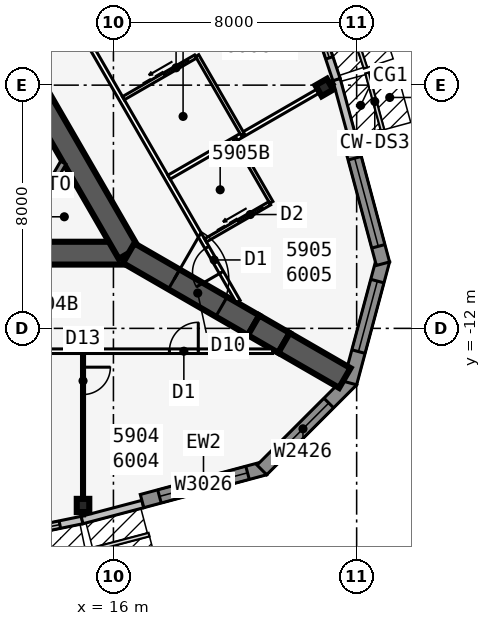
"""IFC4 building model, lengths in metres.
Left out: names, types, materials, properties, quantities, classifications, styles, units other than length and angle.
Written with IfcOpenShell. Run it as: python <this file> out.ifc"""

import sys

from ifc_helpers import new_model, si_unit, direction, frame, frame_2d, origin, origin_2d, place, context, subcontext, project, spatial, polyline, rectangle, i_section, outline, extrude, element, fill, save


model = new_model("IFC4")
c1 = context("Model", 3, precision=1e-05, world=origin(), true_north=direction((0.0, 1.0)))
c2 = subcontext(c1, "Body", "Model", "MODEL_VIEW")
j1 = project(units=[si_unit("LENGTHUNIT", "METRE"), si_unit("PLANEANGLEUNIT", "RADIAN")], contexts=[c1])
p1 = place(None, origin())
s1 = spatial("IfcSite", under=j1, at=p1, CompositionType="ELEMENT")
p2 = place(p1, origin())
s2 = spatial("IfcBuilding", under=s1, at=p2, CompositionType="ELEMENT")
p3 = place(p2, frame((0.0, 0.0, 222.5)))
s3 = spatial("IfcBuildingStorey", under=s2, at=p3, CompositionType="ELEMENT", Elevation=222.5)
p4 = place(p3, frame((-16.5, -9.526, 0.0), z_axis=(0.0, 0.0, 1.0), x_axis=(1.0, 0.0, 0.0)))
e1 = element("IfcWall", 1, at=p4, inside=s3, PredefinedType="SHEAR", context=c2, shape_type="SweptSolid", body=[
    extrude(rectangle(XDim=33.0, YDim=0.75, at=frame_2d((16.5, 0.0))), origin(), (0.0, 0.0, 1.0), 3.6),
])
p5 = place(p4, frame((14.05, 0.0, 0.0)))
e2 = element("IfcOpeningElement", 2, at=p5, cuts=e1, PredefinedType="OPENING", context=c2, shape_type="SweptSolid", body=[
    extrude(rectangle(XDim=1.8, YDim=2.13, at=frame_2d((0.9, 1.065))), frame((0.0, 0.385, 0.0), z_axis=(0.0, -1.0, 0.0), x_axis=(1.0, 0.0, 0.0)), (0.0, 0.0, 1.0), 0.77),
])
p6 = place(p3, frame((16.5, -9.526, 0.0), z_axis=(0.0, 0.0, 1.0), x_axis=(-0.499999749417, 0.866025548458, 0.0)))
e3 = element("IfcWall", 3, at=p6, inside=s3, PredefinedType="SHEAR", context=c2, shape_type="SweptSolid", body=[
    extrude(rectangle(XDim=33.0, YDim=0.75, at=frame_2d((16.5, 0.0))), origin(), (0.0, 0.0, 1.0), 3.6),
])
p7 = place(p6, frame((14.15, 0.0, 0.0)))
e4 = element("IfcOpeningElement", 4, at=p7, cuts=e3, PredefinedType="OPENING", context=c2, shape_type="SweptSolid", body=[
    extrude(rectangle(XDim=1.8, YDim=2.13, at=frame_2d((0.9, 1.065))), frame((0.0, 0.385, 0.0), z_axis=(0.0, -1.0, 0.0), x_axis=(1.0, 0.0, 0.0)), (0.0, 0.0, 1.0), 0.77),
])
p8 = place(p6, frame((12.6, 0.0, 0.0)))
e5 = element("IfcOpeningElement", 5, at=p8, cuts=e3, PredefinedType="OPENING", context=c2, shape_type="SweptSolid", body=[
    extrude(rectangle(XDim=1.0, YDim=2.13, at=frame_2d((0.5, 1.065))), frame((0.0, 0.385, 0.0), z_axis=(0.0, -1.0, 0.0), x_axis=(1.0, 0.0, 0.0)), (0.0, 0.0, 1.0), 0.77),
])
p9 = place(p3, frame((16.5, -9.526, 0.0), z_axis=(0.0, 0.0, 1.0), x_axis=(0.866031398331, -0.499989616998, 0.0)))
e6 = element("IfcWall", 6, at=p9, inside=s3, PredefinedType="SHEAR", context=c2, shape_type="SweptSolid", body=[
    extrude(rectangle(XDim=4.746, YDim=0.75, at=frame_2d((2.373, 0.0))), origin(), (0.0, 0.0, 1.0), 3.6),
])
p10 = place(p9, frame((1.725, 0.0, 0.0)))
e7 = element("IfcOpeningElement", 7, at=p10, cuts=e6, PredefinedType="OPENING", context=c2, shape_type="SweptSolid", body=[
    extrude(rectangle(XDim=1.8, YDim=2.13, at=frame_2d((0.9, 1.065))), frame((0.0, 0.385, 0.0), z_axis=(0.0, -1.0, 0.0), x_axis=(1.0, 0.0, 0.0)), (0.0, 0.0, 1.0), 0.77),
])
p11 = place(p3, frame((20.61, -11.899, 0.0), z_axis=(0.0, 0.0, 1.0), x_axis=(0.866009537788, -0.500027479704, 0.0)))
e8 = element("IfcWall", 8, at=p11, inside=s3, PredefinedType="SHEAR", context=c2, shape_type="SweptSolid", body=[
    extrude(rectangle(XDim=1.155, YDim=0.75, at=frame_2d((0.577, 0.0))), origin(), (0.0, 0.0, 1.0), 3.6),
])
p12 = place(p3, frame((21.61, -12.477, 0.0), z_axis=(0.0, 0.0, 1.0), x_axis=(0.866055313784, -0.499948190782, 0.0)))
e9 = element("IfcWall", 9, at=p12, inside=s3, PredefinedType="SHEAR", context=c2, shape_type="SweptSolid", body=[
    extrude(rectangle(XDim=2.309, YDim=0.75, at=frame_2d((1.155, 0.0))), origin(), (0.0, 0.0, 1.0), 3.6),
])
for number, where, z_axis, x_axis in (
    (10, (15.0, -17.825, 0.0), (0.0, 0.0, 1.0), (1.0, 0.0, 0.0)),
    (11, (22.937, -4.078, 0.0), (0.0, 0.0, 1.0), (-0.5, 0.866, 0.0)),
):
    element("IfcColumn", number, at=place(p3, frame(where, z_axis=z_axis, x_axis=x_axis)), inside=s3, PredefinedType="COLUMN", context=c2, shape_type="SweptSolid", body=[
        extrude(i_section(OverallWidth=0.411, OverallDepth=0.434, WebThickness=0.036, FlangeThickness=0.057, at=origin_2d()), origin(), (0.0, 0.0, 1.0), 3.6),
    ])
p13 = place(p3, frame((9.975, -19.332, 0.0), z_axis=(0.0, 0.0, 1.0), x_axis=(0.979461488189, 0.201631329795, 0.0)))
e12 = element("IfcWall", 12, at=p13, inside=s3, PredefinedType="STANDARD", context=c2, shape_type="SweptSolid", body=[
    extrude(rectangle(XDim=5.105, YDim=0.25, at=frame_2d((2.552, 0.0))), origin(), (0.0, 0.0, 1.0), 3.435),
])
p14 = place(p13, frame((0.752, 0.0, 0.45)))
e13 = element("IfcOpeningElement", 13, at=p14, cuts=e12, PredefinedType="OPENING", context=c2, shape_type="SweptSolid", body=[
    extrude(rectangle(XDim=3.6, YDim=2.6, at=frame_2d((1.8, 1.3))), frame((0.0, 0.135, 0.0), z_axis=(0.0, -1.0, 0.0), x_axis=(1.0, 0.0, 0.0)), (0.0, 0.0, 1.0), 0.27),
])
p15 = place(p3, frame((14.968, -18.304, 0.0), z_axis=(0.0, 0.0, 1.0), x_axis=(0.967010286052, 0.254737328772, 0.0)))
e14 = element("IfcWall", 14, at=p15, inside=s3, PredefinedType="STANDARD", context=c2, shape_type="SweptSolid", body=[
    extrude(rectangle(XDim=2.068, YDim=0.25, at=frame_2d((1.034, 0.0))), origin(), (0.0, 0.0, 1.0), 3.435),
])
p16 = place(p3, frame((16.942, -17.681, 0.0), z_axis=(0.0, 0.0, 1.0), x_axis=(0.965920442324, 0.258839137498, 0.0)))
e15 = element("IfcWall", 15, at=p16, inside=s3, PredefinedType="SOLIDWALL", context=c2, shape_type="SweptSolid", body=[
    extrude(rectangle(XDim=4.184, YDim=0.45, at=frame_2d((2.092, 0.0))), origin(), (0.0, 0.0, 1.0), 3.435),
])
p17 = place(p16, frame((0.592, 0.0, 0.45)))
e16 = element("IfcOpeningElement", 16, at=p17, cuts=e15, PredefinedType="OPENING", context=c2, shape_type="SweptSolid", body=[
    extrude(rectangle(XDim=3.0, YDim=2.6, at=frame_2d((1.5, 1.3))), frame((0.0, 0.235, 0.0), z_axis=(0.0, -1.0, 0.0), x_axis=(1.0, 0.0, 0.0)), (0.0, 0.0, 1.0), 0.47),
])
p18 = place(p3, frame((20.882, -16.656, 0.0), z_axis=(0.0, 0.0, 1.0), x_axis=(0.707077605902, 0.707135955267, 0.0)))
e17 = element("IfcWall", 17, at=p18, inside=s3, PredefinedType="SOLIDWALL", context=c2, shape_type="SweptSolid", body=[
    extrude(outline(polyline([(4.184, 0.225), (4.125, 0.225), (3.705, 0.113), (3.675, 0.225), (0.0, 0.225), (0.0, -0.225), (4.184, -0.225), (4.184, 0.225)])), origin(), (0.0, 0.0, 1.0), 3.435),
])
p19 = place(p18, frame((0.713, 0.0, 0.45)))
e18 = element("IfcOpeningElement", 18, at=p19, cuts=e17, PredefinedType="OPENING", context=c2, shape_type="SweptSolid", body=[
    extrude(rectangle(XDim=2.4, YDim=2.6, at=frame_2d((1.2, 1.3))), frame((0.0, 0.235, 0.0), z_axis=(0.0, -1.0, 0.0), x_axis=(1.0, 0.0, 0.0)), (0.0, 0.0, 1.0), 0.47),
])
p20 = place(p3, frame((23.783, -13.798, 0.0), z_axis=(0.0, 0.0, 1.0), x_axis=(0.258799282522, 0.96593112144, 0.0)))
e19 = element("IfcWall", 19, at=p20, inside=s3, PredefinedType="SOLIDWALL", context=c2, shape_type="SweptSolid", body=[
    extrude(outline(polyline([(4.184, 0.225), (0.509, 0.225), (0.479, 0.113), (0.059, 0.225), (0.0, 0.225), (0.0, -0.225), (4.184, -0.225), (4.184, 0.225)])), origin(), (0.0, 0.0, 1.0), 3.435),
])
p21 = place(p20, frame((1.071, 0.0, 0.45)))
e20 = element("IfcOpeningElement", 20, at=p21, cuts=e19, PredefinedType="OPENING", context=c2, shape_type="SweptSolid", body=[
    extrude(rectangle(XDim=2.4, YDim=2.6, at=frame_2d((1.2, 1.3))), frame((0.0, 0.235, 0.0), z_axis=(0.0, -1.0, 0.0), x_axis=(1.0, 0.0, 0.0)), (0.0, 0.0, 1.0), 0.47),
])
p22 = place(p3, frame((24.865, -9.873, 0.0), z_axis=(0.0, 0.0, 1.0), x_axis=(-0.258784695888, 0.965935029479, 0.0)))
e21 = element("IfcWall", 21, at=p22, inside=s3, PredefinedType="SOLIDWALL", context=c2, shape_type="SweptSolid", body=[
    extrude(rectangle(XDim=4.184, YDim=0.45, at=frame_2d((2.092, 0.0))), origin(), (0.0, 0.0, 1.0), 3.435),
])
p23 = place(p22, frame((0.592, 0.0, 0.45)))
e22 = element("IfcOpeningElement", 22, at=p23, cuts=e21, PredefinedType="OPENING", context=c2, shape_type="SweptSolid", body=[
    extrude(rectangle(XDim=3.0, YDim=2.6, at=frame_2d((1.5, 1.3))), frame((0.0, 0.235, 0.0), z_axis=(0.0, -1.0, 0.0), x_axis=(1.0, 0.0, 0.0)), (0.0, 0.0, 1.0), 0.47),
])
p24 = place(p3, frame((23.879, -5.806, 0.0), z_axis=(0.0, 0.0, 1.0), x_axis=(-0.262867703986, 0.964831887015, 0.0)))
e23 = element("IfcWall", 23, at=p24, inside=s3, PredefinedType="STANDARD", context=c2, shape_type="SweptSolid", body=[
    extrude(rectangle(XDim=2.068, YDim=0.25, at=frame_2d((1.034, 0.0))), origin(), (0.0, 0.0, 1.0), 3.435),
])
p25 = place(p3, frame((23.338, -3.817, 0.0), z_axis=(0.0, 0.0, 1.0), x_axis=(-0.315108478109, 0.949055660656, 0.0)))
e24 = element("IfcWall", 24, at=p25, inside=s3, PredefinedType="STANDARD", context=c2, shape_type="SweptSolid", body=[
    extrude(rectangle(XDim=5.105, YDim=0.25, at=frame_2d((2.552, 0.0))), origin(), (0.0, 0.0, 1.0), 3.435),
])
p26 = place(p25, frame((0.752, 0.0, 0.45)))
e25 = element("IfcOpeningElement", 25, at=p26, cuts=e24, PredefinedType="OPENING", context=c2, shape_type="SweptSolid", body=[
    extrude(rectangle(XDim=3.6, YDim=2.6, at=frame_2d((1.8, 1.3))), frame((0.0, 0.135, 0.0), z_axis=(0.0, -1.0, 0.0), x_axis=(1.0, 0.0, 0.0)), (0.0, 0.0, 1.0), 0.27),
])
p27 = place(p3, frame((-21.236, -12.751, 0.0), z_axis=(0.0, 0.0, 1.0), x_axis=(1.0, 0.0, 0.0)))
e26 = element("IfcWall", 26, at=p27, inside=s3, PredefinedType="PARTITIONING", context=c2, shape_type="SweptSolid", body=[
    extrude(rectangle(XDim=42.472, YDim=0.15, at=frame_2d((21.236, 0.0))), origin(), (0.0, 0.0, 1.0), 3.435),
])
p28 = place(p27, frame((2.444, 0.0, 0.0)))
e27 = element("IfcOpeningElement", 27, at=p28, cuts=e26, PredefinedType="OPENING", context=c2, shape_type="SweptSolid", body=[
    extrude(rectangle(XDim=0.95, YDim=2.13, at=frame_2d((0.475, 1.065))), frame((0.0, 0.085, 0.0), z_axis=(0.0, -1.0, 0.0), x_axis=(1.0, 0.0, 0.0)), (0.0, 0.0, 1.0), 0.17),
])
p29 = place(p27, frame((13.261, 0.0, 0.0)))
e28 = element("IfcOpeningElement", 28, at=p29, cuts=e26, PredefinedType="OPENING", context=c2, shape_type="SweptSolid", body=[
    extrude(rectangle(XDim=0.95, YDim=2.13, at=frame_2d((0.475, 1.065))), frame((0.0, 0.085, 0.0), z_axis=(0.0, -1.0, 0.0), x_axis=(1.0, 0.0, 0.0)), (0.0, 0.0, 1.0), 0.17),
])
p30 = place(p27, frame((23.236, 0.0, 0.0)))
e29 = element("IfcOpeningElement", 29, at=p30, cuts=e26, PredefinedType="OPENING", context=c2, shape_type="SweptSolid", body=[
    extrude(rectangle(XDim=1.0, YDim=2.13, at=frame_2d((0.5, 1.065))), frame((0.0, 0.085, 0.0), z_axis=(0.0, -1.0, 0.0), x_axis=(1.0, 0.0, 0.0)), (0.0, 0.0, 1.0), 0.17),
])
p31 = place(p27, frame((29.461, 0.0, 0.0)))
e30 = element("IfcOpeningElement", 30, at=p31, cuts=e26, PredefinedType="OPENING", context=c2, shape_type="SweptSolid", body=[
    extrude(rectangle(XDim=0.95, YDim=2.13, at=frame_2d((0.475, 1.065))), frame((0.0, 0.085, 0.0), z_axis=(0.0, -1.0, 0.0), x_axis=(1.0, 0.0, 0.0)), (0.0, 0.0, 1.0), 0.17),
])
p32 = place(p27, frame((39.077, 0.0, 0.0)))
e31 = element("IfcOpeningElement", 31, at=p32, cuts=e26, PredefinedType="OPENING", context=c2, shape_type="SweptSolid", body=[
    extrude(rectangle(XDim=0.95, YDim=2.13, at=frame_2d((0.475, 1.065))), frame((0.0, 0.085, 0.0), z_axis=(0.0, -1.0, 0.0), x_axis=(1.0, 0.0, 0.0)), (0.0, 0.0, 1.0), 0.17),
])
p33 = place(p3, frame((15.0, -12.826, 0.0), z_axis=(0.0, 0.0, 1.0), x_axis=(0.0, -1.0, 0.0)))
e32 = element("IfcWall", 32, at=p33, inside=s3, PredefinedType="PARTITIONING", context=c2, shape_type="SweptSolid", body=[
    extrude(rectangle(XDim=5.34, YDim=0.1, at=frame_2d((2.67, 0.0))), origin(), (0.0, 0.0, 1.0), 2.589),
])
p34 = place(p33, frame((0.45, 0.0, 0.0)))
e33 = element("IfcOpeningElement", 33, at=p34, cuts=e32, PredefinedType="OPENING", context=c2, shape_type="SweptSolid", body=[
    extrude(rectangle(XDim=0.9, YDim=2.13, at=frame_2d((0.45, 1.065))), frame((0.0, 0.06, 0.0), z_axis=(0.0, -1.0, 0.0), x_axis=(1.0, 0.0, 0.0)), (0.0, 0.0, 1.0), 0.12),
])
p35 = place(p3, frame((20.102, -11.115, 0.0), z_axis=(0.0, 0.0, 1.0), x_axis=(-0.500000265775, 0.866025250339, 0.0)))
e34 = element("IfcWall", 34, at=p35, inside=s3, PredefinedType="PARTITIONING", context=c2, shape_type="SweptSolid", body=[
    extrude(rectangle(XDim=39.354, YDim=0.15, at=frame_2d((19.677, 0.0))), origin(), (0.0, 0.0, 1.0), 3.435),
])
p36 = place(p35, frame((1.102, 0.0, 0.0)))
e35 = element("IfcOpeningElement", 35, at=p36, cuts=e34, PredefinedType="OPENING", context=c2, shape_type="SweptSolid", body=[
    extrude(rectangle(XDim=0.95, YDim=2.13, at=frame_2d((0.475, 1.065))), frame((0.0, 0.085, 0.0), z_axis=(0.0, -1.0, 0.0), x_axis=(1.0, 0.0, 0.0)), (0.0, 0.0, 1.0), 0.17),
])
p37 = place(p35, frame((11.702, 0.0, 0.0)))
e36 = element("IfcOpeningElement", 36, at=p37, cuts=e34, PredefinedType="OPENING", context=c2, shape_type="SweptSolid", body=[
    extrude(rectangle(XDim=0.95, YDim=2.13, at=frame_2d((0.475, 1.065))), frame((0.0, 0.085, 0.0), z_axis=(0.0, -1.0, 0.0), x_axis=(1.0, 0.0, 0.0)), (0.0, 0.0, 1.0), 0.17),
])
p38 = place(p35, frame((26.702, 0.0, 0.0)))
e37 = element("IfcOpeningElement", 37, at=p38, cuts=e34, PredefinedType="OPENING", context=c2, shape_type="SweptSolid", body=[
    extrude(rectangle(XDim=0.95, YDim=2.13, at=frame_2d((0.475, 1.065))), frame((0.0, 0.085, 0.0), z_axis=(0.0, -1.0, 0.0), x_axis=(1.0, 0.0, 0.0)), (0.0, 0.0, 1.0), 0.17),
])
p39 = place(p35, frame((37.302, 0.0, 0.0)))
e38 = element("IfcOpeningElement", 38, at=p39, cuts=e34, PredefinedType="OPENING", context=c2, shape_type="SweptSolid", body=[
    extrude(rectangle(XDim=0.95, YDim=2.13, at=frame_2d((0.475, 1.065))), frame((0.0, 0.085, 0.0), z_axis=(0.0, -1.0, 0.0), x_axis=(1.0, 0.0, 0.0)), (0.0, 0.0, 1.0), 0.17),
])
p40 = place(p3, frame((17.829, -7.027, 0.0), z_axis=(0.0, 0.0, 1.0), x_axis=(0.866026604282, 0.499997920671, 0.0)))
e39 = element("IfcWall", 39, at=p40, inside=s3, PredefinedType="PARTITIONING", context=c2, shape_type="SweptSolid", body=[
    extrude(rectangle(XDim=6.24, YDim=0.15, at=frame_2d((3.12, 0.0))), origin(), (0.0, 0.0, 1.0), 2.589),
])
p41 = place(p3, frame((21.194, -7.856, 0.0), z_axis=(0.0, 0.0, 1.0), x_axis=(-0.500033551112, 0.866006032174, 0.0)))
e40 = element("IfcWall", 40, at=p41, inside=s3, PredefinedType="PLUMBINGWALL", context=c2, shape_type="SweptSolid", body=[
    extrude(rectangle(XDim=2.4, YDim=0.12, at=frame_2d((1.2, 0.0))), origin(), (0.0, 0.0, 1.0), 3.435),
])
p42 = place(p3, frame((19.029, -9.106, 0.0), z_axis=(0.0, 0.0, 1.0), x_axis=(0.866023955769, 0.500002508028, 0.0)))
e41 = element("IfcWall", 41, at=p42, inside=s3, PredefinedType="PLUMBINGWALL", context=c2, shape_type="SweptSolid", body=[
    extrude(rectangle(XDim=2.44, YDim=0.12, at=frame_2d((1.22, 0.0))), origin(), (0.0, 0.0, 1.0), 3.435),
])
p43 = place(p42, frame((1.25, 0.0, 0.0)))
e42 = element("IfcOpeningElement", 42, at=p43, cuts=e41, PredefinedType="OPENING", context=c2, shape_type="SweptSolid", body=[
    extrude(rectangle(XDim=0.9, YDim=2.13, at=frame_2d((0.45, 1.065))), frame((0.0, 0.07, 0.0), z_axis=(0.0, -1.0, 0.0), x_axis=(1.0, 0.0, 0.0)), (0.0, 0.0, 1.0), 0.14),
])
p44 = place(p3, frame((20.253, -5.627, 0.0), z_axis=(0.0, 0.0, 1.0), x_axis=(-0.50002537861, 0.866010750942, 0.0)))
e43 = element("IfcWall", 43, at=p44, inside=s3, PredefinedType="PLUMBINGWALL", context=c2, shape_type="SweptSolid", body=[
    extrude(rectangle(XDim=3.0, YDim=0.12, at=frame_2d((1.5, 0.0))), origin(), (0.0, 0.0, 1.0), 3.435),
])
p45 = place(p3, frame((16.329, -4.429, 0.0), z_axis=(0.0, 0.0, 1.0), x_axis=(0.865997131366, 0.500048966069, 0.0)))
e44 = element("IfcWall", 44, at=p45, inside=s3, PredefinedType="PLUMBINGWALL", context=c2, shape_type="SweptSolid", body=[
    extrude(rectangle(XDim=2.74, YDim=0.12, at=frame_2d((1.37, 0.0))), origin(), (0.0, 0.0, 1.0), 3.435),
])
p46 = place(p45, frame((1.55, 0.0, 0.0)))
e45 = element("IfcOpeningElement", 45, at=p46, cuts=e44, PredefinedType="OPENING", context=c2, shape_type="SweptSolid", body=[
    extrude(rectangle(XDim=0.9, YDim=2.13, at=frame_2d((0.45, 1.065))), frame((0.0, 0.07, 0.0), z_axis=(0.0, -1.0, 0.0), x_axis=(1.0, 0.0, 0.0)), (0.0, 0.0, 1.0), 0.14),
])
p47 = place(p3, frame((14.349, -6.551, 0.0), z_axis=(0.0, 0.0, 1.0), x_axis=(-0.499952404951, -0.866052881055, 0.0)))
e46 = element("IfcWall", 46, at=p47, inside=s3, PredefinedType="SOLIDWALL", context=c2, shape_type="SweptSolid", body=[
    extrude(rectangle(XDim=3.002, YDim=0.2, at=frame_2d((1.501, 0.0))), origin(), (0.0, 0.0, 1.0), 3.435),
])
p48 = place(p14, origin())
e47 = element("IfcWindow", 47, at=p48, inside=s3, PartitioningType="SINGLE_PANEL", PredefinedType="WINDOW", context=c2, shape_type="SweptSolid", body=[
    extrude(rectangle(XDim=3.6, YDim=2.6, at=frame_2d((1.8, 1.3))), frame((0.0, 0.03, 0.0), z_axis=(0.0, -1.0, 0.0), x_axis=(1.0, 0.0, 0.0)), (0.0, 0.0, 1.0), 0.06),
])
fill(e13, e47)
p49 = place(p17, origin())
e48 = element("IfcWindow", 48, at=p49, inside=s3, PartitioningType="SINGLE_PANEL", PredefinedType="WINDOW", context=c2, shape_type="SweptSolid", body=[
    extrude(rectangle(XDim=3.0, YDim=2.6, at=frame_2d((1.5, 1.3))), frame((0.0, 0.03, 0.0), z_axis=(0.0, -1.0, 0.0), x_axis=(1.0, 0.0, 0.0)), (0.0, 0.0, 1.0), 0.06),
])
fill(e16, e48)
p50 = place(p19, origin())
e49 = element("IfcWindow", 49, at=p50, inside=s3, PartitioningType="SINGLE_PANEL", PredefinedType="WINDOW", context=c2, shape_type="SweptSolid", body=[
    extrude(rectangle(XDim=2.4, YDim=2.6, at=frame_2d((1.2, 1.3))), frame((0.0, 0.03, 0.0), z_axis=(0.0, -1.0, 0.0), x_axis=(1.0, 0.0, 0.0)), (0.0, 0.0, 1.0), 0.06),
])
fill(e18, e49)
p51 = place(p21, origin())
e50 = element("IfcWindow", 50, at=p51, inside=s3, PartitioningType="SINGLE_PANEL", PredefinedType="WINDOW", context=c2, shape_type="SweptSolid", body=[
    extrude(rectangle(XDim=2.4, YDim=2.6, at=frame_2d((1.2, 1.3))), frame((0.0, 0.03, 0.0), z_axis=(0.0, -1.0, 0.0), x_axis=(1.0, 0.0, 0.0)), (0.0, 0.0, 1.0), 0.06),
])
fill(e20, e50)
p52 = place(p23, origin())
e51 = element("IfcWindow", 51, at=p52, inside=s3, PartitioningType="SINGLE_PANEL", PredefinedType="WINDOW", context=c2, shape_type="SweptSolid", body=[
    extrude(rectangle(XDim=3.0, YDim=2.6, at=frame_2d((1.5, 1.3))), frame((0.0, 0.03, 0.0), z_axis=(0.0, -1.0, 0.0), x_axis=(1.0, 0.0, 0.0)), (0.0, 0.0, 1.0), 0.06),
])
fill(e22, e51)
p53 = place(p26, origin())
e52 = element("IfcWindow", 52, at=p53, inside=s3, PartitioningType="SINGLE_PANEL", PredefinedType="WINDOW", context=c2, shape_type="SweptSolid", body=[
    extrude(rectangle(XDim=3.6, YDim=2.6, at=frame_2d((1.8, 1.3))), frame((0.0, 0.03, 0.0), z_axis=(0.0, -1.0, 0.0), x_axis=(1.0, 0.0, 0.0)), (0.0, 0.0, 1.0), 0.06),
])
fill(e25, e52)
p54 = place(p34, origin())
e53 = element("IfcDoor", 53, at=p54, inside=s3, OperationType="SINGLE_SWING_LEFT", PredefinedType="DOOR", context=c2, shape_type="SweptSolid", body=[
    extrude(rectangle(XDim=0.9, YDim=2.13, at=frame_2d((0.45, 1.065))), frame((0.0, 0.025, 0.0), z_axis=(0.0, -1.0, 0.0), x_axis=(1.0, 0.0, 0.0)), (0.0, 0.0, 1.0), 0.05),
])
fill(e33, e53)
p55 = place(p32, origin())
e54 = element("IfcDoor", 54, at=p55, inside=s3, OperationType="SINGLE_SWING_RIGHT", PredefinedType="DOOR", context=c2, shape_type="SweptSolid", body=[
    extrude(rectangle(XDim=0.95, YDim=2.13, at=frame_2d((0.475, 1.065))), frame((0.0, 0.025, 0.0), z_axis=(0.0, -1.0, 0.0), x_axis=(1.0, 0.0, 0.0)), (0.0, 0.0, 1.0), 0.05),
])
fill(e31, e54)
p56 = place(p43, origin())
e55 = element("IfcDoor", 55, at=p56, inside=s3, OperationType="SLIDING_TO_LEFT", PredefinedType="DOOR", context=c2, shape_type="SweptSolid", body=[
    extrude(rectangle(XDim=0.9, YDim=2.13, at=frame_2d((0.45, 1.065))), frame((0.0, 0.025, 0.0), z_axis=(0.0, -1.0, 0.0), x_axis=(1.0, 0.0, 0.0)), (0.0, 0.0, 1.0), 0.05),
])
fill(e42, e55)
p57 = place(p36, origin())
e56 = element("IfcDoor", 56, at=p57, inside=s3, OperationType="SINGLE_SWING_LEFT", PredefinedType="DOOR", context=c2, shape_type="SweptSolid", body=[
    extrude(rectangle(XDim=0.95, YDim=2.13, at=frame_2d((0.475, 1.065))), frame((0.0, 0.025, 0.0), z_axis=(0.0, -1.0, 0.0), x_axis=(1.0, 0.0, 0.0)), (0.0, 0.0, 1.0), 0.05),
])
fill(e35, e56)
p58 = place(p46, origin())
e57 = element("IfcDoor", 57, at=p58, inside=s3, OperationType="SLIDING_TO_LEFT", PredefinedType="DOOR", context=c2, shape_type="SweptSolid", body=[
    extrude(rectangle(XDim=0.9, YDim=2.13, at=frame_2d((0.45, 1.065))), frame((0.0, 0.025, 0.0), z_axis=(0.0, -1.0, 0.0), x_axis=(1.0, 0.0, 0.0)), (0.0, 0.0, 1.0), 0.05),
])
fill(e45, e57)
p59 = place(p10, origin())
e58 = element("IfcDoor", 58, at=p59, inside=s3, OperationType="DOUBLE_DOOR_DOUBLE_SWING", PredefinedType="DOOR", context=c2, shape_type="SweptSolid", body=[
    extrude(rectangle(XDim=1.8, YDim=2.13, at=frame_2d((0.9, 1.065))), frame((0.0, 0.025, 0.0), z_axis=(0.0, -1.0, 0.0), x_axis=(1.0, 0.0, 0.0)), (0.0, 0.0, 1.0), 0.05),
])
fill(e7, e58)
save(model, sys.argv[1])
